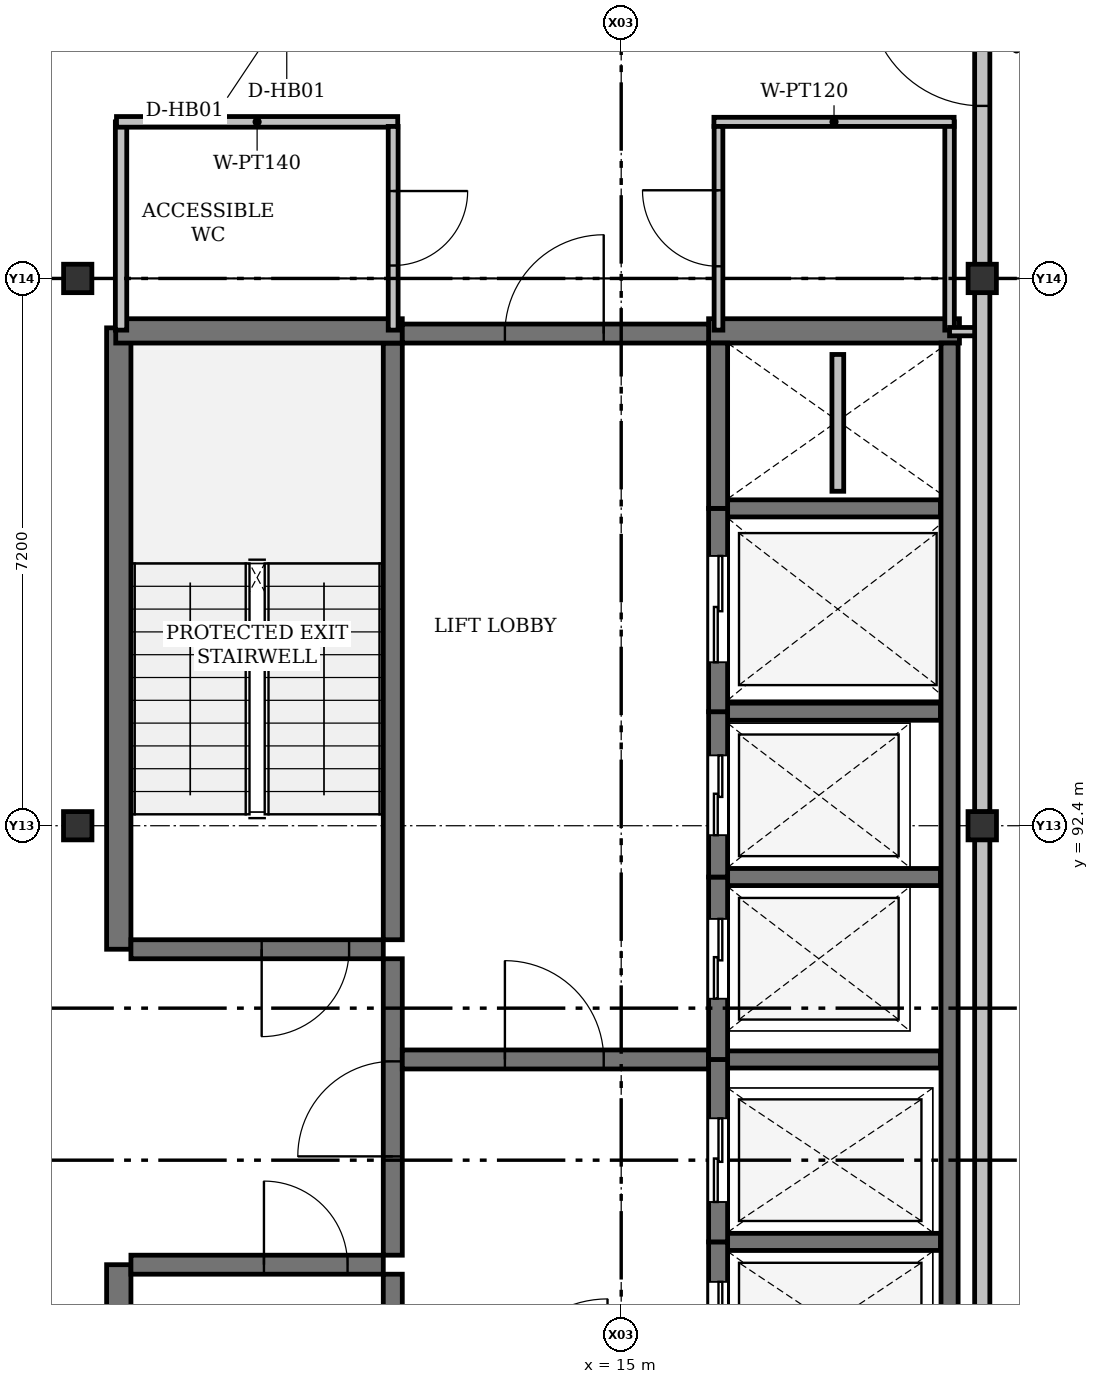
"""IFC4 building model, lengths in metres.
Left out: names, types, materials, properties, quantities, classifications, styles, units other than length and angle.
Written with IfcOpenShell. Run it as: python <this file> out.ifc"""

import sys

from ifc_helpers import new_model, si_unit, direction, frame, frame_2d, origin, origin_2d, place, context, subcontext, project, spatial, rectangle, i_section, extrude, element, fill, save


model = new_model("IFC4")
c1 = context("Model", 3, precision=1e-05, world=origin(), true_north=direction((0.0, 1.0)))
c2 = subcontext(c1, "Body", "Model", "MODEL_VIEW")
j1 = project(units=[si_unit("LENGTHUNIT", "METRE"), si_unit("PLANEANGLEUNIT", "RADIAN")], contexts=[c1])
p1 = place(None, origin())
s1 = spatial("IfcSite", under=j1, at=p1, CompositionType="ELEMENT")
p2 = place(p1, origin())
s2 = spatial("IfcBuilding", under=s1, at=p2, CompositionType="ELEMENT")
p3 = place(p2, frame((0.0, 0.0, 30.9)))
s3 = spatial("IfcBuildingStorey", under=s2, at=p3, CompositionType="ELEMENT", Elevation=30.9)
for number, where, z_axis, x_axis in (
    (1, (7.85, 92.4, 0.0), (0.0, 0.0, 1.0), (1.0, 0.0, 0.0)),
    (2, (19.75, 92.4, 0.0), (0.0, 0.0, 1.0), (1.0, 0.0, 0.0)),
    (3, (7.85, 99.6, 0.0), (0.0, 0.0, 1.0), (0.0, 1.0, 0.0)),
    (4, (19.75, 99.6, 0.0), (0.0, 0.0, 1.0), (0.0, 1.0, 0.0)),
):
    element("IfcColumn", number, at=place(p3, frame(where, z_axis=z_axis, x_axis=x_axis)), inside=s3, PredefinedType="COLUMN", context=c2, shape_type="SweptSolid", body=[
        extrude(i_section(OverallWidth=0.374, OverallDepth=0.372, WebThickness=0.016, FlangeThickness=0.026, FilletRadius=0.015, at=origin_2d()), origin(), (0.0, 0.0, 1.0), 4.2),
    ])
for number, where, z_axis, x_axis in (
    (5, (8.39, 78.45, 0.0), (0.0, 0.0, 1.0), (0.0, 1.0, 0.0)),
    (6, (8.39, 90.775, 0.0), (0.0, 0.0, 1.0), (0.0, 1.0, 0.0)),
):
    element("IfcWall", number, at=place(p3, frame(where, z_axis=z_axis, x_axis=x_axis)), inside=s3, PredefinedType="SHEAR", context=c2, shape_type="SweptSolid", body=[
        extrude(rectangle(XDim=8.175, YDim=0.32, at=frame_2d((4.087, 0.0))), origin(), (0.0, 0.0, 1.0), 4.2),
    ])
for number, where, z_axis, x_axis in (
    (7, (11.995, 78.65, 0.0), (0.0, 0.0, 1.0), (0.0, 1.0, 0.0)),
    (8, (11.995, 90.9, 0.0), (0.0, 0.0, 1.0), (0.0, 1.0, 0.0)),
):
    element("IfcWall", number, at=place(p3, frame(where, z_axis=z_axis, x_axis=x_axis)), inside=s3, PredefinedType="SHEAR", context=c2, shape_type="SweptSolid", body=[
        extrude(rectangle(XDim=7.85, YDim=0.25, at=frame_2d((3.925, 0.0))), origin(), (0.0, 0.0, 1.0), 4.2),
    ])
p4 = place(p3, frame((11.995, 86.75, 0.0), z_axis=(0.0, 0.0, 1.0), x_axis=(0.0, 1.0, 0.0)))
e9 = element("IfcWall", 9, at=p4, inside=s3, PredefinedType="SHEAR", context=c2, shape_type="SweptSolid", body=[
    extrude(rectangle(XDim=3.9, YDim=0.25, at=frame_2d((1.95, 0.0))), origin(), (0.0, 0.0, 1.0), 4.2),
])
p5 = place(p4, frame((1.3, 0.0, 0.0)))
e10 = element("IfcOpeningElement", 10, at=p5, cuts=e9, PredefinedType="OPENING", context=c2, shape_type="SweptSolid", body=[
    extrude(rectangle(XDim=1.25, YDim=2.2, at=frame_2d((0.625, 1.1))), frame((0.0, 0.125, 0.0), z_axis=(0.0, -1.0, 0.0), x_axis=(1.0, 0.0, 0.0)), (0.0, 0.0, 1.0), 0.25),
])
p6 = place(p3, frame((8.35, 98.91, 0.0), z_axis=(0.0, 0.0, 1.0), x_axis=(1.0, 0.0, 0.0)))
e11 = element("IfcWall", 11, at=p6, inside=s3, PredefinedType="SHEAR", context=c2, shape_type="SweptSolid", body=[
    extrude(rectangle(XDim=3.77, YDim=0.32, at=frame_2d((1.885, 0.0))), origin(), (0.0, 0.0, 1.0), 4.2),
])
p7 = place(p3, frame((16.15, 98.91, 0.0), z_axis=(0.0, 0.0, 1.0), x_axis=(1.0, 0.0, 0.0)))
e12 = element("IfcWall", 12, at=p7, inside=s3, PredefinedType="SHEAR", context=c2, shape_type="SweptSolid", body=[
    extrude(rectangle(XDim=3.3, YDim=0.32, at=frame_2d((1.65, 0.0))), origin(), (0.0, 0.0, 1.0), 4.2),
])
p8 = place(p3, frame((12.12, 98.875, 0.0), z_axis=(0.0, 0.0, 1.0), x_axis=(1.0, 0.0, 0.0)))
e13 = element("IfcWall", 13, at=p8, inside=s3, PredefinedType="SHEAR", context=c2, shape_type="SweptSolid", body=[
    extrude(rectangle(XDim=4.03, YDim=0.25, at=frame_2d((2.015, 0.0))), origin(), (0.0, 0.0, 1.0), 4.2),
])
p9 = place(p8, frame((1.35, 0.0, 0.0)))
e14 = element("IfcOpeningElement", 14, at=p9, cuts=e13, PredefinedType="OPENING", context=c2, shape_type="SweptSolid", body=[
    extrude(rectangle(XDim=1.3, YDim=2.2, at=frame_2d((0.65, 1.1))), frame((0.0, 0.125, 0.0), z_axis=(0.0, -1.0, 0.0), x_axis=(1.0, 0.0, 0.0)), (0.0, 0.0, 1.0), 0.25),
])
p10 = place(p3, frame((8.55, 86.625, 0.0), z_axis=(0.0, 0.0, 1.0), x_axis=(1.0, 0.0, 0.0)))
e15 = element("IfcWall", 15, at=p10, inside=s3, PredefinedType="SHEAR", context=c2, shape_type="SweptSolid", body=[
    extrude(rectangle(XDim=3.32, YDim=0.25, at=frame_2d((1.66, 0.0))), origin(), (0.0, 0.0, 1.0), 4.2),
])
p11 = place(p10, frame((1.75, 0.0, 0.0)))
e16 = element("IfcOpeningElement", 16, at=p11, cuts=e15, PredefinedType="OPENING", context=c2, shape_type="SweptSolid", body=[
    extrude(rectangle(XDim=1.1, YDim=2.15, at=frame_2d((0.55, 1.075))), frame((0.0, 0.125, 0.0), z_axis=(0.0, -1.0, 0.0), x_axis=(1.0, 0.0, 0.0)), (0.0, 0.0, 1.0), 0.25),
])
p12 = place(p3, frame((11.87, 90.775, 0.0), z_axis=(0.0, 0.0, 1.0), x_axis=(-1.0, 0.0, 0.0)))
e17 = element("IfcWall", 17, at=p12, inside=s3, PredefinedType="SHEAR", context=c2, shape_type="SweptSolid", body=[
    extrude(rectangle(XDim=3.32, YDim=0.25, at=frame_2d((1.66, 0.0))), origin(), (0.0, 0.0, 1.0), 4.2),
])
p13 = place(p12, frame((0.45, 0.0, 0.0)))
e18 = element("IfcOpeningElement", 18, at=p13, cuts=e17, PredefinedType="OPENING", context=c2, shape_type="SweptSolid", body=[
    extrude(rectangle(XDim=1.15, YDim=2.15, at=frame_2d((0.575, 1.075))), frame((0.0, 0.125, 0.0), z_axis=(0.0, -1.0, 0.0), x_axis=(1.0, 0.0, 0.0)), (0.0, 0.0, 1.0), 0.25),
])
p14 = place(p3, frame((12.12, 89.325, 0.0), z_axis=(0.0, 0.0, 1.0), x_axis=(1.0, 0.0, 0.0)))
e19 = element("IfcWall", 19, at=p14, inside=s3, PredefinedType="SHEAR", context=c2, shape_type="SweptSolid", body=[
    extrude(rectangle(XDim=4.03, YDim=0.25, at=frame_2d((2.015, 0.0))), origin(), (0.0, 0.0, 1.0), 4.2),
])
p15 = place(p14, frame((1.35, 0.0, 0.0)))
e20 = element("IfcOpeningElement", 20, at=p15, cuts=e19, PredefinedType="OPENING", context=c2, shape_type="SweptSolid", body=[
    extrude(rectangle(XDim=1.3, YDim=2.2, at=frame_2d((0.65, 1.1))), frame((0.0, 0.125, 0.0), z_axis=(0.0, -1.0, 0.0), x_axis=(1.0, 0.0, 0.0)), (0.0, 0.0, 1.0), 0.25),
])
p16 = place(p3, frame((19.32, 84.8, 0.0), z_axis=(0.0, 0.0, 1.0), x_axis=(0.0, 1.0, 0.0)))
e21 = element("IfcWall", 21, at=p16, inside=s3, PredefinedType="SHEAR", context=c2, shape_type="SweptSolid", body=[
    extrude(rectangle(XDim=13.95, YDim=0.225, at=frame_2d((6.975, 0.0))), origin(), (0.0, 0.0, 1.0), 4.2),
])
for number, where, z_axis, x_axis in (
    (22, (16.4, 86.925, 0.0), (0.0, 0.0, 1.0), (1.0, 0.0, 0.0)),
    (23, (16.4, 89.325, 0.0), (0.0, 0.0, 1.0), (1.0, 0.0, 0.0)),
    (24, (16.4, 91.725, 0.0), (0.0, 0.0, 1.0), (1.0, 0.0, 0.0)),
    (25, (16.4, 93.9, 0.0), (0.0, 0.0, 1.0), (1.0, 0.0, 0.0)),
    (26, (16.4, 96.575, 0.0), (0.0, 0.0, 1.0), (1.0, 0.0, 0.0)),
):
    element("IfcWall", number, at=place(p3, frame(where, z_axis=z_axis, x_axis=x_axis)), inside=s3, PredefinedType="SHEAR", context=c2, shape_type="SweptSolid", body=[
        extrude(rectangle(XDim=2.8, YDim=0.225, at=frame_2d((1.4, 0.0))), origin(), (0.0, 0.0, 1.0), 4.2),
    ])
p17 = place(p3, frame((16.275, 84.8, 0.0), z_axis=(0.0, 0.0, 1.0), x_axis=(0.0, 1.0, 0.0)))
e27 = element("IfcWall", 27, at=p17, inside=s3, PredefinedType="SHEAR", context=c2, shape_type="SweptSolid", body=[
    extrude(rectangle(XDim=2.125, YDim=0.25, at=frame_2d((1.062, 0.0))), origin(), (0.0, 0.0, 1.0), 4.2),
])
p18 = place(p17, frame((0.5, 0.0, 0.0)))
e28 = element("IfcOpeningElement", 28, at=p18, cuts=e27, PredefinedType="OPENING", context=c2, shape_type="SweptSolid", body=[
    extrude(rectangle(XDim=1.1, YDim=2.15, at=frame_2d((0.55, 1.075))), frame((0.0, 0.125, 0.0), z_axis=(0.0, -1.0, 0.0), x_axis=(1.0, 0.0, 0.0)), (0.0, 0.0, 1.0), 0.25),
])
p19 = place(p3, frame((16.275, 86.925, 0.0), z_axis=(0.0, 0.0, 1.0), x_axis=(0.0, 1.0, 0.0)))
e29 = element("IfcWall", 29, at=p19, inside=s3, PredefinedType="SHEAR", context=c2, shape_type="SweptSolid", body=[
    extrude(rectangle(XDim=2.4, YDim=0.25, at=frame_2d((1.2, 0.0))), origin(), (0.0, 0.0, 1.0), 4.2),
])
p20 = place(p19, frame((0.525, 0.0, 0.0)))
e30 = element("IfcOpeningElement", 30, at=p20, cuts=e29, PredefinedType="OPENING", context=c2, shape_type="SweptSolid", body=[
    extrude(rectangle(XDim=1.1, YDim=2.15, at=frame_2d((0.55, 1.075))), frame((0.0, 0.125, 0.0), z_axis=(0.0, -1.0, 0.0), x_axis=(1.0, 0.0, 0.0)), (0.0, 0.0, 1.0), 0.25),
])
p21 = place(p3, frame((16.275, 89.325, 0.0), z_axis=(0.0, 0.0, 1.0), x_axis=(0.0, 1.0, 0.0)))
e31 = element("IfcWall", 31, at=p21, inside=s3, PredefinedType="SHEAR", context=c2, shape_type="SweptSolid", body=[
    extrude(rectangle(XDim=2.4, YDim=0.25, at=frame_2d((1.2, 0.0))), origin(), (0.0, 0.0, 1.0), 4.2),
])
p22 = place(p21, frame((0.8, 0.0, 0.0)))
e32 = element("IfcOpeningElement", 32, at=p22, cuts=e31, PredefinedType="OPENING", context=c2, shape_type="SweptSolid", body=[
    extrude(rectangle(XDim=1.05, YDim=2.15, at=frame_2d((0.525, 1.075))), frame((0.0, 0.125, 0.0), z_axis=(0.0, -1.0, 0.0), x_axis=(1.0, 0.0, 0.0)), (0.0, 0.0, 1.0), 0.25),
])
p23 = place(p3, frame((16.275, 91.725, 0.0), z_axis=(0.0, 0.0, 1.0), x_axis=(0.0, 1.0, 0.0)))
e33 = element("IfcWall", 33, at=p23, inside=s3, PredefinedType="SHEAR", context=c2, shape_type="SweptSolid", body=[
    extrude(rectangle(XDim=2.175, YDim=0.25, at=frame_2d((1.087, 0.0))), origin(), (0.0, 0.0, 1.0), 4.2),
])
p24 = place(p23, frame((0.55, 0.0, 0.0)))
e34 = element("IfcOpeningElement", 34, at=p24, cuts=e33, PredefinedType="OPENING", context=c2, shape_type="SweptSolid", body=[
    extrude(rectangle(XDim=1.05, YDim=2.15, at=frame_2d((0.525, 1.075))), frame((0.0, 0.125, 0.0), z_axis=(0.0, -1.0, 0.0), x_axis=(1.0, 0.0, 0.0)), (0.0, 0.0, 1.0), 0.25),
])
p25 = place(p3, frame((16.275, 93.9, 0.0), z_axis=(0.0, 0.0, 1.0), x_axis=(0.0, 1.0, 0.0)))
e35 = element("IfcWall", 35, at=p25, inside=s3, PredefinedType="SHEAR", context=c2, shape_type="SweptSolid", body=[
    extrude(rectangle(XDim=2.675, YDim=0.25, at=frame_2d((1.337, 0.0))), origin(), (0.0, 0.0, 1.0), 4.2),
])
p26 = place(p25, frame((0.65, 0.0, 0.0)))
e36 = element("IfcOpeningElement", 36, at=p26, cuts=e35, PredefinedType="OPENING", context=c2, shape_type="SweptSolid", body=[
    extrude(rectangle(XDim=1.4, YDim=2.25, at=frame_2d((0.7, 1.125))), frame((0.0, 0.125, 0.0), z_axis=(0.0, -1.0, 0.0), x_axis=(1.0, 0.0, 0.0)), (0.0, 0.0, 1.0), 0.25),
])
p27 = place(p3, frame((16.275, 96.575, 0.0), z_axis=(0.0, 0.0, 1.0), x_axis=(0.0, 1.0, 0.0)))
e37 = element("IfcWall", 37, at=p27, inside=s3, PredefinedType="SHEAR", context=c2, shape_type="SweptSolid", body=[
    extrude(rectangle(XDim=2.175, YDim=0.25, at=frame_2d((1.087, 0.0))), origin(), (0.0, 0.0, 1.0), 4.2),
])
p28 = place(p3, frame((17.85, 96.8, 0.0), z_axis=(0.0, 0.0, 1.0), x_axis=(0.0, 1.0, 0.0)))
e38 = element("IfcWall", 38, at=p28, inside=s3, PredefinedType="PLUMBINGWALL", context=c2, shape_type="SweptSolid", body=[
    extrude(rectangle(XDim=1.8, YDim=0.155, at=frame_2d((0.9, 0.0))), origin(), (0.0, 0.0, 1.0), 4.2),
])
p29 = place(p3, frame((8.42, 98.92, 0.0), z_axis=(0.0, 0.0, 1.0), x_axis=(0.0, 1.0, 0.0)))
e39 = element("IfcWall", 39, at=p29, inside=s3, PredefinedType="PARTITIONING", context=c2, shape_type="SweptSolid", body=[
    extrude(rectangle(XDim=2.74, YDim=0.15, at=frame_2d((1.37, 0.0))), origin(), (0.0, 0.0, 1.0), 3.436),
])
p30 = place(p3, frame((8.36, 101.66, 0.0), z_axis=(0.0, 0.0, 1.0), x_axis=(1.0, 0.0, 0.0)))
e40 = element("IfcWall", 40, at=p30, inside=s3, PredefinedType="PARTITIONING", context=c2, shape_type="SweptSolid", body=[
    extrude(rectangle(XDim=3.7, YDim=0.14, at=frame_2d((1.85, 0.0))), origin(), (0.0, 0.0, 1.0), 3.95),
])
p31 = place(p3, frame((12.0, 101.6, 0.0), z_axis=(0.0, 0.0, 1.0), x_axis=(0.0, -1.0, 0.0)))
e41 = element("IfcWall", 41, at=p31, inside=s3, PredefinedType="PARTITIONING", context=c2, shape_type="SweptSolid", body=[
    extrude(rectangle(XDim=2.68, YDim=0.13, at=frame_2d((1.34, 0.0))), origin(), (0.0, 0.0, 1.0), 3.436),
])
p32 = place(p31, frame((0.85, 0.0, 0.0)))
e42 = element("IfcOpeningElement", 42, at=p32, cuts=e41, PredefinedType="OPENING", context=c2, shape_type="SweptSolid", body=[
    extrude(rectangle(XDim=0.98, YDim=2.1, at=frame_2d((0.49, 1.05))), frame((0.0, 0.065, 0.0), z_axis=(0.0, -1.0, 0.0), x_axis=(1.0, 0.0, 0.0)), (0.0, 0.0, 1.0), 0.13),
])
p33 = place(p3, frame((19.32, 98.92, 0.0), z_axis=(0.0, 0.0, 1.0), x_axis=(0.0, 1.0, 0.0)))
e43 = element("IfcWall", 43, at=p33, inside=s3, PredefinedType="PARTITIONING", context=c2, shape_type="SweptSolid", body=[
    extrude(rectangle(XDim=2.74, YDim=0.125, at=frame_2d((1.37, 0.0))), origin(), (0.0, 0.0, 1.0), 3.436),
])
p34 = place(p3, frame((19.38, 101.66, 0.0), z_axis=(0.0, 0.0, 1.0), x_axis=(-1.0, 0.0, 0.0)))
e44 = element("IfcWall", 44, at=p34, inside=s3, PredefinedType="PARTITIONING", context=c2, shape_type="SweptSolid", body=[
    extrude(rectangle(XDim=3.16, YDim=0.12, at=frame_2d((1.58, 0.0))), origin(), (0.0, 0.0, 1.0), 3.95),
])
p35 = place(p3, frame((16.28, 98.92, 0.0), z_axis=(0.0, 0.0, 1.0), x_axis=(0.0, 1.0, 0.0)))
e45 = element("IfcWall", 45, at=p35, inside=s3, PredefinedType="PARTITIONING", context=c2, shape_type="SweptSolid", body=[
    extrude(rectangle(XDim=2.68, YDim=0.115, at=frame_2d((1.34, 0.0))), origin(), (0.0, 0.0, 1.0), 3.436),
])
p36 = place(p35, frame((0.84, 0.0, 0.0)))
e46 = element("IfcOpeningElement", 46, at=p36, cuts=e45, PredefinedType="OPENING", context=c2, shape_type="SweptSolid", body=[
    extrude(rectangle(XDim=1.0, YDim=2.1, at=frame_2d((0.5, 1.05))), frame((0.0, 0.058, 0.0), z_axis=(0.0, -1.0, 0.0), x_axis=(1.0, 0.0, 0.0)), (0.0, 0.0, 1.0), 0.115),
])
p37 = place(p3, frame((19.75, 98.9, 0.0), z_axis=(0.0, 0.0, 1.0), x_axis=(-1.0, 0.0, 0.0)))
e47 = element("IfcWall", 47, at=p37, inside=s3, PredefinedType="PARTITIONING", context=c2, shape_type="SweptSolid", body=[
    extrude(rectangle(XDim=0.43, YDim=0.11, at=frame_2d((0.215, 0.0))), origin(), (0.0, 0.0, 1.0), 3.512),
])
for number, where, z_axis, x_axis in (
    (48, (19.75, 85.382, 0.0), (0.0, 0.0, 1.0), (0.0, 1.0, 0.0)),
    (49, (19.75, 92.581, 0.0), (0.0, 0.0, 1.0), (0.0, 1.0, 0.0)),
):
    element("IfcWall", number, at=place(p3, frame(where, z_axis=z_axis, x_axis=x_axis)), inside=s3, PredefinedType="SOLIDWALL", context=c2, shape_type="SweptSolid", body=[
        extrude(rectangle(XDim=6.837, YDim=0.2, at=frame_2d((3.418, 0.0))), origin(), (0.0, 0.0, 1.0), 3.512),
    ])
p38 = place(p3, frame((19.75, 99.782, 0.0), z_axis=(0.0, 0.0, 1.0), x_axis=(0.0, 1.0, 0.0)))
e50 = element("IfcWall", 50, at=p38, inside=s3, PredefinedType="SOLIDWALL", context=c2, shape_type="SweptSolid", body=[
    extrude(rectangle(XDim=3.818, YDim=0.2, at=frame_2d((1.909, 0.0))), origin(), (0.0, 0.0, 1.0), 3.512),
])
p39 = place(p38, frame((2.088, 0.0, 0.0)))
e51 = element("IfcOpeningElement", 51, at=p39, cuts=e50, PredefinedType="OPENING", context=c2, shape_type="SweptSolid", body=[
    extrude(rectangle(XDim=1.5, YDim=2.3, at=frame_2d((0.75, 1.15))), frame((0.0, 0.1, 0.0), z_axis=(0.0, -1.0, 0.0), x_axis=(1.0, 0.0, 0.0)), (0.0, 0.0, 1.0), 0.2),
])
p40 = place(p5, origin())
e52 = element("IfcDoor", 52, at=p40, inside=s3, OperationType="SINGLE_SWING_LEFT", PredefinedType="DOOR", context=c2, shape_type="SweptSolid", body=[
    extrude(rectangle(XDim=1.25, YDim=2.2, at=frame_2d((0.625, 1.1))), frame((0.0, 0.025, 0.0), z_axis=(0.0, -1.0, 0.0), x_axis=(1.0, 0.0, 0.0)), (0.0, 0.0, 1.0), 0.05),
])
fill(e10, e52)
p41 = place(p9, origin())
e53 = element("IfcDoor", 53, at=p41, inside=s3, OperationType="SINGLE_SWING_RIGHT", PredefinedType="DOOR", context=c2, shape_type="SweptSolid", body=[
    extrude(rectangle(XDim=1.3, YDim=2.2, at=frame_2d((0.65, 1.1))), frame((0.0, 0.025, 0.0), z_axis=(0.0, -1.0, 0.0), x_axis=(1.0, 0.0, 0.0)), (0.0, 0.0, 1.0), 0.05),
])
fill(e14, e53)
p42 = place(p11, origin())
e54 = element("IfcDoor", 54, at=p42, inside=s3, OperationType="SINGLE_SWING_LEFT", PredefinedType="DOOR", context=c2, shape_type="SweptSolid", body=[
    extrude(rectangle(XDim=1.1, YDim=2.15, at=frame_2d((0.55, 1.075))), frame((0.0, 0.025, 0.0), z_axis=(0.0, -1.0, 0.0), x_axis=(1.0, 0.0, 0.0)), (0.0, 0.0, 1.0), 0.05),
])
fill(e16, e54)
p43 = place(p13, origin())
e55 = element("IfcDoor", 55, at=p43, inside=s3, OperationType="SINGLE_SWING_RIGHT", PredefinedType="DOOR", context=c2, shape_type="SweptSolid", body=[
    extrude(rectangle(XDim=1.15, YDim=2.15, at=frame_2d((0.575, 1.075))), frame((0.0, 0.025, 0.0), z_axis=(0.0, -1.0, 0.0), x_axis=(1.0, 0.0, 0.0)), (0.0, 0.0, 1.0), 0.05),
])
fill(e18, e55)
p44 = place(p15, origin())
e56 = element("IfcDoor", 56, at=p44, inside=s3, OperationType="SINGLE_SWING_LEFT", PredefinedType="DOOR", context=c2, shape_type="SweptSolid", body=[
    extrude(rectangle(XDim=1.3, YDim=2.2, at=frame_2d((0.65, 1.1))), frame((0.0, 0.025, 0.0), z_axis=(0.0, -1.0, 0.0), x_axis=(1.0, 0.0, 0.0)), (0.0, 0.0, 1.0), 0.05),
])
fill(e20, e56)
p45 = place(p18, origin())
e57 = element("IfcDoor", 57, at=p45, inside=s3, OperationType="SLIDING_TO_LEFT", PredefinedType="DOOR", context=c2, shape_type="SweptSolid", body=[
    extrude(rectangle(XDim=1.1, YDim=2.15, at=frame_2d((0.55, 1.075))), frame((0.0, 0.025, 0.0), z_axis=(0.0, -1.0, 0.0), x_axis=(1.0, 0.0, 0.0)), (0.0, 0.0, 1.0), 0.05),
])
fill(e28, e57)
p46 = place(p20, origin())
e58 = element("IfcDoor", 58, at=p46, inside=s3, OperationType="SLIDING_TO_LEFT", PredefinedType="DOOR", context=c2, shape_type="SweptSolid", body=[
    extrude(rectangle(XDim=1.1, YDim=2.15, at=frame_2d((0.55, 1.075))), frame((0.0, 0.025, 0.0), z_axis=(0.0, -1.0, 0.0), x_axis=(1.0, 0.0, 0.0)), (0.0, 0.0, 1.0), 0.05),
])
fill(e30, e58)
p47 = place(p22, origin())
e59 = element("IfcDoor", 59, at=p47, inside=s3, OperationType="SLIDING_TO_LEFT", PredefinedType="DOOR", context=c2, shape_type="SweptSolid", body=[
    extrude(rectangle(XDim=1.05, YDim=2.15, at=frame_2d((0.525, 1.075))), frame((0.0, 0.025, 0.0), z_axis=(0.0, -1.0, 0.0), x_axis=(1.0, 0.0, 0.0)), (0.0, 0.0, 1.0), 0.05),
])
fill(e32, e59)
p48 = place(p24, origin())
e60 = element("IfcDoor", 60, at=p48, inside=s3, OperationType="SLIDING_TO_LEFT", PredefinedType="DOOR", context=c2, shape_type="SweptSolid", body=[
    extrude(rectangle(XDim=1.05, YDim=2.15, at=frame_2d((0.525, 1.075))), frame((0.0, 0.025, 0.0), z_axis=(0.0, -1.0, 0.0), x_axis=(1.0, 0.0, 0.0)), (0.0, 0.0, 1.0), 0.05),
])
fill(e34, e60)
p49 = place(p26, origin())
e61 = element("IfcDoor", 61, at=p49, inside=s3, OperationType="SLIDING_TO_LEFT", PredefinedType="DOOR", context=c2, shape_type="SweptSolid", body=[
    extrude(rectangle(XDim=1.4, YDim=2.25, at=frame_2d((0.7, 1.125))), frame((0.0, 0.025, 0.0), z_axis=(0.0, -1.0, 0.0), x_axis=(1.0, 0.0, 0.0)), (0.0, 0.0, 1.0), 0.05),
])
fill(e36, e61)
p50 = place(p32, origin())
e62 = element("IfcDoor", 62, at=p50, inside=s3, OperationType="SINGLE_SWING_LEFT", PredefinedType="DOOR", context=c2, shape_type="SweptSolid", body=[
    extrude(rectangle(XDim=0.98, YDim=2.1, at=frame_2d((0.49, 1.05))), frame((0.0, 0.025, 0.0), z_axis=(0.0, -1.0, 0.0), x_axis=(1.0, 0.0, 0.0)), (0.0, 0.0, 1.0), 0.05),
])
fill(e42, e62)
p51 = place(p36, origin())
e63 = element("IfcDoor", 63, at=p51, inside=s3, OperationType="SINGLE_SWING_RIGHT", PredefinedType="DOOR", context=c2, shape_type="SweptSolid", body=[
    extrude(rectangle(XDim=1.0, YDim=2.1, at=frame_2d((0.5, 1.05))), frame((0.0, 0.025, 0.0), z_axis=(0.0, -1.0, 0.0), x_axis=(1.0, 0.0, 0.0)), (0.0, 0.0, 1.0), 0.05),
])
fill(e46, e63)
p52 = place(p39, origin())
e64 = element("IfcDoor", 64, at=p52, inside=s3, OperationType="SINGLE_SWING_RIGHT", PredefinedType="DOOR", context=c2, shape_type="SweptSolid", body=[
    extrude(rectangle(XDim=1.5, YDim=2.3, at=frame_2d((0.75, 1.15))), frame((0.0, 0.025, 0.0), z_axis=(0.0, -1.0, 0.0), x_axis=(1.0, 0.0, 0.0)), (0.0, 0.0, 1.0), 0.05),
])
fill(e51, e64)
save(model, sys.argv[1])
